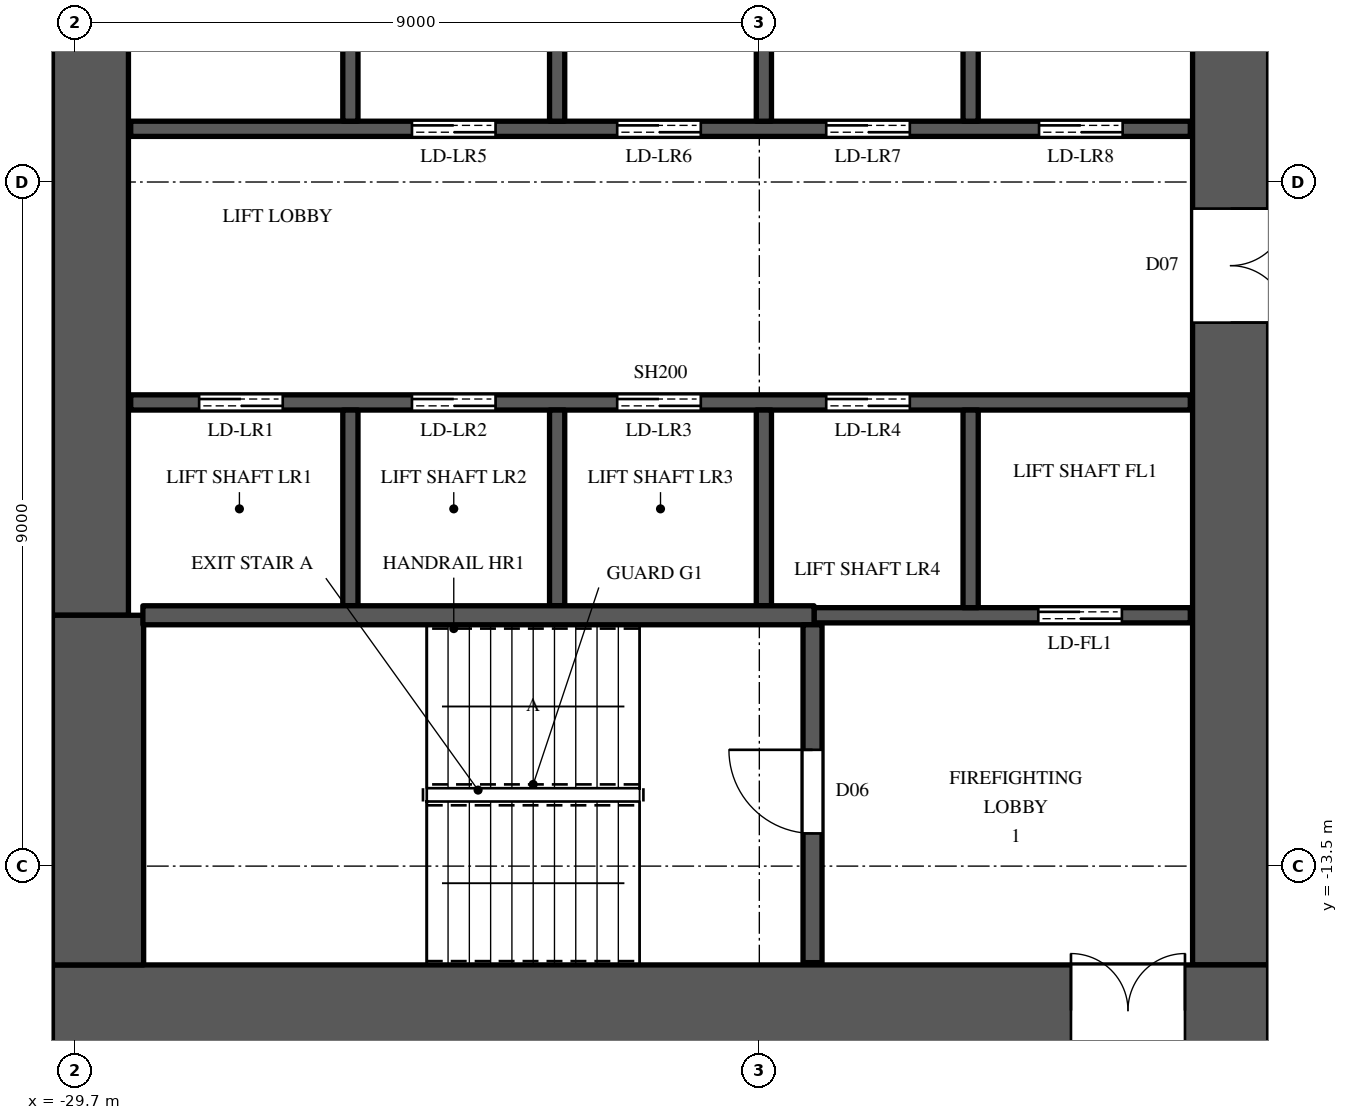
"""IFC4 building model, lengths in metres.
Left out: names, types, materials, properties, quantities, classifications, styles, units other than length and angle.
Written with IfcOpenShell. Run it as: python <this file> out.ifc"""

import sys

from ifc_helpers import new_model, si_unit, direction, frame, frame_2d, origin, place, context, subcontext, project, spatial, rectangle, extrude, element, fill, save


model = new_model("IFC4")
c1 = context("Model", 3, precision=1e-05, world=origin(), true_north=direction((0.0, 1.0)))
c2 = subcontext(c1, "Body", "Model", "MODEL_VIEW")
j1 = project(units=[si_unit("LENGTHUNIT", "METRE"), si_unit("PLANEANGLEUNIT", "RADIAN")], contexts=[c1])
p1 = place(None, origin())
s1 = spatial("IfcSite", under=j1, at=p1, CompositionType="ELEMENT")
p2 = place(p1, origin())
s2 = spatial("IfcBuilding", under=s1, at=p2, CompositionType="ELEMENT")
p3 = place(p2, frame((0.0, 0.0, 120.3)))
s3 = spatial("IfcBuildingStorey", under=s2, at=p3, CompositionType="ELEMENT", Elevation=120.3)
p4 = place(p3, frame((-30.0, -15.4, 0.0), z_axis=(0.0, 0.0, 1.0), x_axis=(1.0, 0.0, 0.0)))
e1 = element("IfcWall", 1, at=p4, inside=s3, PredefinedType="SHEAR", context=c2, shape_type="SweptSolid", body=[
    extrude(rectangle(XDim=16.0, YDim=1.2, at=frame_2d((8.0, 0.0))), origin(), (0.0, 0.0, 1.0), 3.6),
])
p5 = place(p4, frame((13.4, 0.0, 0.0)))
e2 = element("IfcOpeningElement", 2, at=p5, cuts=e1, PredefinedType="OPENING", context=c2, shape_type="SweptSolid", body=[
    extrude(rectangle(XDim=1.5, YDim=2.4, at=frame_2d((0.75, 1.2))), frame((0.0, 0.61, 0.0), z_axis=(0.0, -1.0, 0.0), x_axis=(1.0, 0.0, 0.0)), (0.0, 0.0, 1.0), 1.22),
])
p6 = place(p3, frame((-14.5, -14.8, 0.0), z_axis=(0.0, 0.0, 1.0), x_axis=(0.0, 1.0, 0.0)))
e3 = element("IfcWall", 3, at=p6, inside=s3, PredefinedType="SHEAR", context=c2, shape_type="SweptSolid", body=[
    extrude(rectangle(XDim=29.6, YDim=1.0, at=frame_2d((14.8, 0.0))), origin(), (0.0, 0.0, 1.0), 3.6),
])
p7 = place(p6, frame((8.45, 0.0, 0.0)))
e4 = element("IfcOpeningElement", 4, at=p7, cuts=e3, PredefinedType="OPENING", context=c2, shape_type="SweptSolid", body=[
    extrude(rectangle(XDim=1.5, YDim=2.4, at=frame_2d((0.75, 1.2))), frame((0.0, 0.51, 0.0), z_axis=(0.0, -1.0, 0.0), x_axis=(1.0, 0.0, 0.0)), (0.0, 0.0, 1.0), 1.02),
])
p8 = place(p6, frame((19.65, 0.0, 0.0)))
e5 = element("IfcOpeningElement", 5, at=p8, cuts=e3, PredefinedType="OPENING", context=c2, shape_type="SweptSolid", body=[
    extrude(rectangle(XDim=1.5, YDim=2.4, at=frame_2d((0.75, 1.2))), frame((0.0, 0.51, 0.0), z_axis=(0.0, -1.0, 0.0), x_axis=(1.0, 0.0, 0.0)), (0.0, 0.0, 1.0), 1.02),
])
p9 = place(p6, frame((14.5, 0.0, 0.0)))
e6 = element("IfcOpeningElement", 6, at=p9, cuts=e3, PredefinedType="OPENING", context=c2, shape_type="SweptSolid", body=[
    extrude(rectangle(XDim=0.6, YDim=2.0, at=frame_2d((0.3, 1.0))), frame((0.0, 0.51, 0.0), z_axis=(0.0, -1.0, 0.0), x_axis=(1.0, 0.0, 0.0)), (0.0, 0.0, 1.0), 1.02),
])
p10 = place(p3, frame((-29.5, -10.2, 0.0), z_axis=(0.0, 0.0, 1.0), x_axis=(0.0, 1.0, 0.0)))
e7 = element("IfcWall", 7, at=p10, inside=s3, PredefinedType="SHEAR", context=c2, shape_type="SweptSolid", body=[
    extrude(rectangle(XDim=20.4, YDim=1.0, at=frame_2d((10.2, 0.0))), origin(), (0.0, 0.0, 1.0), 3.6),
])
p11 = place(p3, frame((-29.4, -14.8, 0.0), z_axis=(0.0, 0.0, 1.0), x_axis=(0.0, 1.0, 0.0)))
e8 = element("IfcWall", 8, at=p11, inside=s3, PredefinedType="SHEAR", context=c2, shape_type="SweptSolid", body=[
    extrude(rectangle(XDim=4.6, YDim=1.2, at=frame_2d((2.3, 0.0))), origin(), (0.0, 0.0, 1.0), 3.6),
])
p12 = place(p3, frame((-28.97, -7.4, 0.0), z_axis=(0.0, 0.0, 1.0), x_axis=(1.0, 0.0, 0.0)))
e9 = element("IfcWall", 9, at=p12, inside=s3, PredefinedType="SHEAR", context=c2, shape_type="SweptSolid", body=[
    extrude(rectangle(XDim=13.94, YDim=0.2, at=frame_2d((6.97, 0.0))), origin(), (0.0, 0.0, 1.0), 3.3),
])
p13 = place(p12, frame((0.9, 0.0, 0.0)))
e10 = element("IfcOpeningElement", 10, at=p13, cuts=e9, PredefinedType="OPENING", context=c2, shape_type="SweptSolid", body=[
    extrude(rectangle(XDim=1.1, YDim=2.2, at=frame_2d((0.55, 1.1))), frame((0.0, 0.11, 0.0), z_axis=(0.0, -1.0, 0.0), x_axis=(1.0, 0.0, 0.0)), (0.0, 0.0, 1.0), 0.22),
])
p14 = place(p12, frame((3.7, 0.0, 0.0)))
e11 = element("IfcOpeningElement", 11, at=p14, cuts=e9, PredefinedType="OPENING", context=c2, shape_type="SweptSolid", body=[
    extrude(rectangle(XDim=1.1, YDim=2.2, at=frame_2d((0.55, 1.1))), frame((0.0, 0.11, 0.0), z_axis=(0.0, -1.0, 0.0), x_axis=(1.0, 0.0, 0.0)), (0.0, 0.0, 1.0), 0.22),
])
p15 = place(p12, frame((6.4, 0.0, 0.0)))
e12 = element("IfcOpeningElement", 12, at=p15, cuts=e9, PredefinedType="OPENING", context=c2, shape_type="SweptSolid", body=[
    extrude(rectangle(XDim=1.1, YDim=2.2, at=frame_2d((0.55, 1.1))), frame((0.0, 0.11, 0.0), z_axis=(0.0, -1.0, 0.0), x_axis=(1.0, 0.0, 0.0)), (0.0, 0.0, 1.0), 0.22),
])
p16 = place(p12, frame((9.15, 0.0, 0.0)))
e13 = element("IfcOpeningElement", 13, at=p16, cuts=e9, PredefinedType="OPENING", context=c2, shape_type="SweptSolid", body=[
    extrude(rectangle(XDim=1.1, YDim=2.2, at=frame_2d((0.55, 1.1))), frame((0.0, 0.11, 0.0), z_axis=(0.0, -1.0, 0.0), x_axis=(1.0, 0.0, 0.0)), (0.0, 0.0, 1.0), 0.22),
])
p17 = place(p3, frame((-28.97, -3.8, 0.0), z_axis=(0.0, 0.0, 1.0), x_axis=(1.0, 0.0, 0.0)))
e14 = element("IfcWall", 14, at=p17, inside=s3, PredefinedType="SHEAR", context=c2, shape_type="SweptSolid", body=[
    extrude(rectangle(XDim=13.94, YDim=0.2, at=frame_2d((6.97, 0.0))), origin(), (0.0, 0.0, 1.0), 3.3),
])
p18 = place(p17, frame((3.7, 0.0, 0.0)))
e15 = element("IfcOpeningElement", 15, at=p18, cuts=e14, PredefinedType="OPENING", context=c2, shape_type="SweptSolid", body=[
    extrude(rectangle(XDim=1.1, YDim=2.2, at=frame_2d((0.55, 1.1))), frame((0.0, 0.11, 0.0), z_axis=(0.0, -1.0, 0.0), x_axis=(1.0, 0.0, 0.0)), (0.0, 0.0, 1.0), 0.22),
])
p19 = place(p17, frame((6.4, 0.0, 0.0)))
e16 = element("IfcOpeningElement", 16, at=p19, cuts=e14, PredefinedType="OPENING", context=c2, shape_type="SweptSolid", body=[
    extrude(rectangle(XDim=1.1, YDim=2.2, at=frame_2d((0.55, 1.1))), frame((0.0, 0.11, 0.0), z_axis=(0.0, -1.0, 0.0), x_axis=(1.0, 0.0, 0.0)), (0.0, 0.0, 1.0), 0.22),
])
p20 = place(p17, frame((9.15, 0.0, 0.0)))
e17 = element("IfcOpeningElement", 17, at=p20, cuts=e14, PredefinedType="OPENING", context=c2, shape_type="SweptSolid", body=[
    extrude(rectangle(XDim=1.1, YDim=2.2, at=frame_2d((0.55, 1.1))), frame((0.0, 0.11, 0.0), z_axis=(0.0, -1.0, 0.0), x_axis=(1.0, 0.0, 0.0)), (0.0, 0.0, 1.0), 0.22),
])
p21 = place(p17, frame((11.95, 0.0, 0.0)))
e18 = element("IfcOpeningElement", 18, at=p21, cuts=e14, PredefinedType="OPENING", context=c2, shape_type="SweptSolid", body=[
    extrude(rectangle(XDim=1.1, YDim=2.2, at=frame_2d((0.55, 1.1))), frame((0.0, 0.11, 0.0), z_axis=(0.0, -1.0, 0.0), x_axis=(1.0, 0.0, 0.0)), (0.0, 0.0, 1.0), 0.22),
])
p22 = place(p3, frame((-26.08, -10.075, 0.0), z_axis=(0.0, 0.0, 1.0), x_axis=(0.0, 1.0, 0.0)))
e19 = element("IfcWall", 19, at=p22, inside=s3, PredefinedType="SHEAR", context=c2, shape_type="SweptSolid", body=[
    extrude(rectangle(XDim=2.575, YDim=0.2, at=frame_2d((1.288, 0.0))), origin(), (0.0, 0.0, 1.0), 3.6),
])
p23 = place(p3, frame((-26.08, -3.7, 0.0), z_axis=(0.0, 0.0, 1.0), x_axis=(0.0, 1.0, 0.0)))
e20 = element("IfcWall", 20, at=p23, inside=s3, PredefinedType="SHEAR", context=c2, shape_type="SweptSolid", body=[
    extrude(rectangle(XDim=2.6, YDim=0.2, at=frame_2d((1.3, 0.0))), origin(), (0.0, 0.0, 1.0), 3.6),
])
p24 = place(p3, frame((-23.36, -10.075, 0.0), z_axis=(0.0, 0.0, 1.0), x_axis=(0.0, 1.0, 0.0)))
e21 = element("IfcWall", 21, at=p24, inside=s3, PredefinedType="SHEAR", context=c2, shape_type="SweptSolid", body=[
    extrude(rectangle(XDim=2.575, YDim=0.2, at=frame_2d((1.288, 0.0))), origin(), (0.0, 0.0, 1.0), 3.6),
])
p25 = place(p3, frame((-23.36, -3.7, 0.0), z_axis=(0.0, 0.0, 1.0), x_axis=(0.0, 1.0, 0.0)))
e22 = element("IfcWall", 22, at=p25, inside=s3, PredefinedType="SHEAR", context=c2, shape_type="SweptSolid", body=[
    extrude(rectangle(XDim=2.6, YDim=0.2, at=frame_2d((1.3, 0.0))), origin(), (0.0, 0.0, 1.0), 3.6),
])
p26 = place(p3, frame((-20.64, -10.075, 0.0), z_axis=(0.0, 0.0, 1.0), x_axis=(0.0, 1.0, 0.0)))
e23 = element("IfcWall", 23, at=p26, inside=s3, PredefinedType="SHEAR", context=c2, shape_type="SweptSolid", body=[
    extrude(rectangle(XDim=2.575, YDim=0.2, at=frame_2d((1.288, 0.0))), origin(), (0.0, 0.0, 1.0), 3.6),
])
p27 = place(p3, frame((-20.64, -3.7, 0.0), z_axis=(0.0, 0.0, 1.0), x_axis=(0.0, 1.0, 0.0)))
e24 = element("IfcWall", 24, at=p27, inside=s3, PredefinedType="SHEAR", context=c2, shape_type="SweptSolid", body=[
    extrude(rectangle(XDim=2.6, YDim=0.2, at=frame_2d((1.3, 0.0))), origin(), (0.0, 0.0, 1.0), 3.6),
])
p28 = place(p3, frame((-19.98, -10.2, 0.0), z_axis=(0.0, 0.0, 1.0), x_axis=(1.0, 0.0, 0.0)))
e25 = element("IfcWall", 25, at=p28, inside=s3, PredefinedType="SHEAR", context=c2, shape_type="SweptSolid", body=[
    extrude(rectangle(XDim=4.95, YDim=0.2, at=frame_2d((2.475, 0.0))), origin(), (0.0, 0.0, 1.0), 3.3),
])
p29 = place(p28, frame((2.95, 0.0, 0.0)))
e26 = element("IfcOpeningElement", 26, at=p29, cuts=e25, PredefinedType="OPENING", context=c2, shape_type="SweptSolid", body=[
    extrude(rectangle(XDim=1.1, YDim=2.2, at=frame_2d((0.55, 1.1))), frame((0.0, 0.11, 0.0), z_axis=(0.0, -1.0, 0.0), x_axis=(1.0, 0.0, 0.0)), (0.0, 0.0, 1.0), 0.22),
])
p30 = place(p3, frame((-17.92, -10.1, 0.0), z_axis=(0.0, 0.0, 1.0), x_axis=(0.0, 1.0, 0.0)))
e27 = element("IfcWall", 27, at=p30, inside=s3, PredefinedType="SHEAR", context=c2, shape_type="SweptSolid", body=[
    extrude(rectangle(XDim=2.6, YDim=0.2, at=frame_2d((1.3, 0.0))), origin(), (0.0, 0.0, 1.0), 3.6),
])
p31 = place(p3, frame((-17.92, -3.7, 0.0), z_axis=(0.0, 0.0, 1.0), x_axis=(0.0, 1.0, 0.0)))
e28 = element("IfcWall", 28, at=p31, inside=s3, PredefinedType="SHEAR", context=c2, shape_type="SweptSolid", body=[
    extrude(rectangle(XDim=2.6, YDim=0.2, at=frame_2d((1.3, 0.0))), origin(), (0.0, 0.0, 1.0), 3.6),
])
p32 = place(p3, frame((-28.81, -10.2, 0.0), z_axis=(0.0, 0.0, 1.0), x_axis=(1.0, 0.0, 0.0)))
e29 = element("IfcWall", 29, at=p32, inside=s3, PredefinedType="SHEAR", context=c2, shape_type="SweptSolid", body=[
    extrude(rectangle(XDim=8.83, YDim=0.25, at=frame_2d((4.415, 0.0))), origin(), (0.0, 0.0, 1.0), 3.3),
])
p33 = place(p3, frame((-20.0, -14.77, 0.0), z_axis=(0.0, 0.0, 1.0), x_axis=(0.0, 1.0, 0.0)))
e30 = element("IfcWall", 30, at=p33, inside=s3, PredefinedType="SHEAR", context=c2, shape_type="SweptSolid", body=[
    extrude(rectangle(XDim=4.445, YDim=0.25, at=frame_2d((2.223, 0.0))), origin(), (0.0, 0.0, 1.0), 3.3),
])
p34 = place(p33, frame((1.7, 0.0, 0.0)))
e31 = element("IfcOpeningElement", 31, at=p34, cuts=e30, PredefinedType="OPENING", context=c2, shape_type="SweptSolid", body=[
    extrude(rectangle(XDim=1.1, YDim=2.2, at=frame_2d((0.55, 1.1))), frame((0.0, 0.135, 0.0), z_axis=(0.0, -1.0, 0.0), x_axis=(1.0, 0.0, 0.0)), (0.0, 0.0, 1.0), 0.27),
])
p35 = place(p34, origin())
e32 = element("IfcDoor", 32, at=p35, inside=s3, OperationType="SINGLE_SWING_RIGHT", PredefinedType="DOOR", context=c2, shape_type="SweptSolid", body=[
    extrude(rectangle(XDim=1.1, YDim=2.2, at=frame_2d((0.55, 1.1))), frame((0.0, 0.025, 0.0), z_axis=(0.0, -1.0, 0.0), x_axis=(1.0, 0.0, 0.0)), (0.0, 0.0, 1.0), 0.05),
])
fill(e31, e32)
p36 = place(p13, origin())
e33 = element("IfcDoor", 33, at=p36, inside=s3, OperationType="DOUBLE_DOOR_SLIDING", PredefinedType="DOOR", context=c2, shape_type="SweptSolid", body=[
    extrude(rectangle(XDim=1.1, YDim=2.2, at=frame_2d((0.55, 1.1))), frame((0.0, 0.025, 0.0), z_axis=(0.0, -1.0, 0.0), x_axis=(1.0, 0.0, 0.0)), (0.0, 0.0, 1.0), 0.05),
])
fill(e10, e33)
p37 = place(p14, origin())
e34 = element("IfcDoor", 34, at=p37, inside=s3, OperationType="DOUBLE_DOOR_SLIDING", PredefinedType="DOOR", context=c2, shape_type="SweptSolid", body=[
    extrude(rectangle(XDim=1.1, YDim=2.2, at=frame_2d((0.55, 1.1))), frame((0.0, 0.025, 0.0), z_axis=(0.0, -1.0, 0.0), x_axis=(1.0, 0.0, 0.0)), (0.0, 0.0, 1.0), 0.05),
])
fill(e11, e34)
p38 = place(p15, origin())
e35 = element("IfcDoor", 35, at=p38, inside=s3, OperationType="DOUBLE_DOOR_SLIDING", PredefinedType="DOOR", context=c2, shape_type="SweptSolid", body=[
    extrude(rectangle(XDim=1.1, YDim=2.2, at=frame_2d((0.55, 1.1))), frame((0.0, 0.025, 0.0), z_axis=(0.0, -1.0, 0.0), x_axis=(1.0, 0.0, 0.0)), (0.0, 0.0, 1.0), 0.05),
])
fill(e12, e35)
p39 = place(p16, origin())
e36 = element("IfcDoor", 36, at=p39, inside=s3, OperationType="DOUBLE_DOOR_SLIDING", PredefinedType="DOOR", context=c2, shape_type="SweptSolid", body=[
    extrude(rectangle(XDim=1.1, YDim=2.2, at=frame_2d((0.55, 1.1))), frame((0.0, 0.025, 0.0), z_axis=(0.0, -1.0, 0.0), x_axis=(1.0, 0.0, 0.0)), (0.0, 0.0, 1.0), 0.05),
])
fill(e13, e36)
p40 = place(p29, origin())
e37 = element("IfcDoor", 37, at=p40, inside=s3, OperationType="DOUBLE_DOOR_SLIDING", PredefinedType="DOOR", context=c2, shape_type="SweptSolid", body=[
    extrude(rectangle(XDim=1.1, YDim=2.2, at=frame_2d((0.55, 1.1))), frame((0.0, 0.025, 0.0), z_axis=(0.0, -1.0, 0.0), x_axis=(1.0, 0.0, 0.0)), (0.0, 0.0, 1.0), 0.05),
])
fill(e26, e37)
p41 = place(p18, origin())
e38 = element("IfcDoor", 38, at=p41, inside=s3, OperationType="DOUBLE_DOOR_SLIDING", PredefinedType="DOOR", context=c2, shape_type="SweptSolid", body=[
    extrude(rectangle(XDim=1.1, YDim=2.2, at=frame_2d((0.55, 1.1))), frame((0.0, 0.025, 0.0), z_axis=(0.0, -1.0, 0.0), x_axis=(1.0, 0.0, 0.0)), (0.0, 0.0, 1.0), 0.05),
])
fill(e15, e38)
p42 = place(p19, origin())
e39 = element("IfcDoor", 39, at=p42, inside=s3, OperationType="DOUBLE_DOOR_SLIDING", PredefinedType="DOOR", context=c2, shape_type="SweptSolid", body=[
    extrude(rectangle(XDim=1.1, YDim=2.2, at=frame_2d((0.55, 1.1))), frame((0.0, 0.025, 0.0), z_axis=(0.0, -1.0, 0.0), x_axis=(1.0, 0.0, 0.0)), (0.0, 0.0, 1.0), 0.05),
])
fill(e16, e39)
p43 = place(p20, origin())
e40 = element("IfcDoor", 40, at=p43, inside=s3, OperationType="DOUBLE_DOOR_SLIDING", PredefinedType="DOOR", context=c2, shape_type="SweptSolid", body=[
    extrude(rectangle(XDim=1.1, YDim=2.2, at=frame_2d((0.55, 1.1))), frame((0.0, 0.025, 0.0), z_axis=(0.0, -1.0, 0.0), x_axis=(1.0, 0.0, 0.0)), (0.0, 0.0, 1.0), 0.05),
])
fill(e17, e40)
p44 = place(p21, origin())
e41 = element("IfcDoor", 41, at=p44, inside=s3, OperationType="DOUBLE_DOOR_SLIDING", PredefinedType="DOOR", context=c2, shape_type="SweptSolid", body=[
    extrude(rectangle(XDim=1.1, YDim=2.2, at=frame_2d((0.55, 1.1))), frame((0.0, 0.025, 0.0), z_axis=(0.0, -1.0, 0.0), x_axis=(1.0, 0.0, 0.0)), (0.0, 0.0, 1.0), 0.05),
])
fill(e18, e41)
p45 = place(p5, origin())
e42 = element("IfcDoor", 42, at=p45, inside=s3, OperationType="DOUBLE_DOOR_SINGLE_SWING", PredefinedType="DOOR", context=c2, shape_type="SweptSolid", body=[
    extrude(rectangle(XDim=1.5, YDim=2.4, at=frame_2d((0.75, 1.2))), frame((0.0, 0.025, 0.0), z_axis=(0.0, -1.0, 0.0), x_axis=(1.0, 0.0, 0.0)), (0.0, 0.0, 1.0), 0.05),
])
fill(e2, e42)
p46 = place(p7, origin())
e43 = element("IfcDoor", 43, at=p46, inside=s3, OperationType="DOUBLE_DOOR_SINGLE_SWING", PredefinedType="DOOR", context=c2, shape_type="SweptSolid", body=[
    extrude(rectangle(XDim=1.5, YDim=2.4, at=frame_2d((0.75, 1.2))), frame((0.0, -0.445, 0.0), z_axis=(0.0, -1.0, 0.0), x_axis=(1.0, 0.0, 0.0)), (0.0, 0.0, 1.0), 0.05),
])
fill(e4, e43)
save(model, sys.argv[1])
